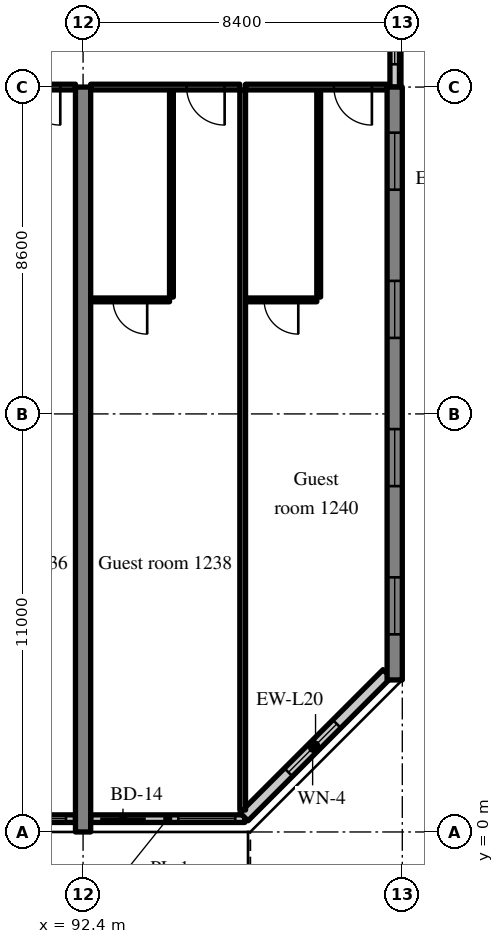
"""IFC4 building model, lengths in metres.
Left out: names, types, materials, properties, quantities, classifications, styles, units other than length and angle.
Written with IfcOpenShell. Run it as: python <this file> out.ifc"""

import sys

from ifc_helpers import new_model, si_unit, direction, frame, frame_2d, origin, place, context, subcontext, project, spatial, rectangle, extrude, source, transform, mapped, element, fill, save


model = new_model("IFC4")
c1 = context("Model", 3, precision=1e-05, world=origin(), true_north=direction((0.0, 1.0)))
c2 = subcontext(c1, "Body", "Model", "MODEL_VIEW")
j1 = project(units=[si_unit("LENGTHUNIT", "METRE"), si_unit("PLANEANGLEUNIT", "RADIAN")], contexts=[c1])
p1 = place(None, origin())
s1 = spatial("IfcSite", under=j1, at=p1, CompositionType="ELEMENT")
p2 = place(p1, origin())
s2 = spatial("IfcBuilding", under=s1, at=p2, CompositionType="ELEMENT")
p3 = place(p2, frame((0.0, 0.0, 54.4)))
s3 = spatial("IfcBuildingStorey", under=s2, at=p3, CompositionType="ELEMENT", Elevation=54.4)
m1 = source(origin(), c2, "Body", "SweptSolid", [
    extrude(rectangle(XDim=19.6, YDim=0.4, at=frame_2d((9.8, 0.0))), origin(), (0.0, 0.0, 1.0), 3.52),
])
p4 = place(p3, frame((92.4, 0.0, 0.0), z_axis=(0.0, 0.0, 1.0), x_axis=(0.0, 1.0, 0.0)))
e1 = element("IfcWall", 1, at=p4, inside=s3, PredefinedType="SHEAR", context=c2, shape_type="MappedRepresentation", body=[
    mapped(m1, transform((0.0, 0.0, 0.0), scale=1.0)),
])
m2 = source(origin(), c2, "Body", "SweptSolid", [
    extrude(rectangle(XDim=15.6, YDim=0.4, at=frame_2d((7.8, 0.0))), origin(), (0.0, 0.0, 1.0), 3.52),
])
p5 = place(p3, frame((100.6, 4.0, 0.0), z_axis=(0.0, 0.0, 1.0), x_axis=(0.0, 1.0, 0.0)))
e2 = element("IfcWall", 2, at=p5, inside=s3, PredefinedType="SHEAR", context=c2, shape_type="MappedRepresentation", body=[
    mapped(m2, transform((0.0, 0.0, 0.0), scale=1.0)),
])
m3 = source(origin(), c2, "Body", "SweptSolid", [
    extrude(rectangle(XDim=1.5, YDim=1.5, at=frame_2d((0.75, 0.75))), frame((0.0, 0.21, 0.0), z_axis=(0.0, -1.0, 0.0), x_axis=(1.0, 0.0, 0.0)), (0.0, 0.0, 1.0), 0.42),
])
p6 = place(p5, frame((1.2, 0.0, 0.9)))
e3 = element("IfcOpeningElement", 3, at=p6, cuts=e2, PredefinedType="OPENING", context=c2, shape_type="MappedRepresentation", body=[
    mapped(m3, transform((0.0, 0.0, 0.0), scale=1.0)),
])
p7 = place(p5, frame((5.1, 0.0, 0.9)))
e4 = element("IfcOpeningElement", 4, at=p7, cuts=e2, PredefinedType="OPENING", context=c2, shape_type="MappedRepresentation", body=[
    mapped(m3, transform((0.0, 0.0, 0.0), scale=1.0)),
])
p8 = place(p5, frame((9.0, 0.0, 0.9)))
e5 = element("IfcOpeningElement", 5, at=p8, cuts=e2, PredefinedType="OPENING", context=c2, shape_type="MappedRepresentation", body=[
    mapped(m3, transform((0.0, 0.0, 0.0), scale=1.0)),
])
p9 = place(p5, frame((12.9, 0.0, 0.9)))
e6 = element("IfcOpeningElement", 6, at=p9, cuts=e2, PredefinedType="OPENING", context=c2, shape_type="MappedRepresentation", body=[
    mapped(m3, transform((0.0, 0.0, 0.0), scale=1.0)),
])
m4 = source(origin(), c2, "Body", "SweptSolid", [
    extrude(rectangle(XDim=3.6, YDim=0.2, at=frame_2d((1.8, 0.0))), origin(), (0.0, 0.0, 1.0), 2.82),
])
p10 = place(p3, frame((88.6, 0.35, 0.0), z_axis=(0.0, 0.0, 1.0), x_axis=(1.0, 0.0, 0.0)))
e7 = element("IfcWall", 7, at=p10, inside=s3, PredefinedType="SOLIDWALL", context=c2, shape_type="MappedRepresentation", body=[
    mapped(m4, transform((0.0, 0.0, 0.0), scale=1.0)),
])
m5 = source(origin(), c2, "Body", "SweptSolid", [
    extrude(rectangle(XDim=1.2, YDim=2.4, at=frame_2d((0.6, 1.2))), frame((0.0, 0.11, 0.0), z_axis=(0.0, -1.0, 0.0), x_axis=(1.0, 0.0, 0.0)), (0.0, 0.0, 1.0), 0.22),
])
p11 = place(p10, frame((0.25, 0.0, 0.0)))
e8 = element("IfcOpeningElement", 8, at=p11, cuts=e7, PredefinedType="OPENING", context=c2, shape_type="MappedRepresentation", body=[
    mapped(m5, transform((0.0, 0.0, 0.0), scale=1.0)),
])
m6 = source(origin(), c2, "Body", "SweptSolid", [
    extrude(rectangle(XDim=1.5, YDim=1.5, at=frame_2d((0.75, 0.75))), frame((0.0, 0.11, 0.0), z_axis=(0.0, -1.0, 0.0), x_axis=(1.0, 0.0, 0.0)), (0.0, 0.0, 1.0), 0.22),
])
p12 = place(p10, frame((1.85, 0.0, 0.9)))
e9 = element("IfcOpeningElement", 9, at=p12, cuts=e7, PredefinedType="OPENING", context=c2, shape_type="MappedRepresentation", body=[
    mapped(m6, transform((0.0, 0.0, 0.0), scale=1.0)),
])
m7 = source(origin(), c2, "Body", "SweptSolid", [
    extrude(rectangle(XDim=4.055, YDim=0.2, at=frame_2d((2.027, 0.0))), origin(), (0.0, 0.0, 1.0), 2.82),
])
p13 = place(p3, frame((92.6, 0.35, 0.0), z_axis=(0.0, 0.0, 1.0), x_axis=(1.0, 0.0, 0.0)))
e10 = element("IfcWall", 10, at=p13, inside=s3, PredefinedType="SOLIDWALL", context=c2, shape_type="MappedRepresentation", body=[
    mapped(m7, transform((0.0, 0.0, 0.0), scale=1.0)),
])
p14 = place(p13, frame((0.25, 0.0, 0.0)))
e11 = element("IfcOpeningElement", 11, at=p14, cuts=e10, PredefinedType="OPENING", context=c2, shape_type="MappedRepresentation", body=[
    mapped(m5, transform((0.0, 0.0, 0.0), scale=1.0)),
])
p15 = place(p13, frame((2.305, 0.0, 0.9)))
e12 = element("IfcOpeningElement", 12, at=p15, cuts=e10, PredefinedType="OPENING", context=c2, shape_type="MappedRepresentation", body=[
    mapped(m6, transform((0.0, 0.0, 0.0), scale=1.0)),
])
m8 = source(origin(), c2, "Body", "SweptSolid", [
    extrude(rectangle(XDim=5.326, YDim=0.3, at=frame_2d((2.663, 0.0))), origin(), (0.0, 0.0, 1.0), 3.52),
])
p16 = place(p3, frame((96.634, 0.4, 0.0), z_axis=(0.0, 0.0, 1.0), x_axis=(0.707083859269, 0.707129702361, 0.0)))
e13 = element("IfcWall", 13, at=p16, inside=s3, PredefinedType="SOLIDWALL", context=c2, shape_type="MappedRepresentation", body=[
    mapped(m8, transform((0.0, 0.0, 0.0), scale=1.0)),
])
m9 = source(origin(), c2, "Body", "SweptSolid", [
    extrude(rectangle(XDim=1.8, YDim=1.5, at=frame_2d((0.9, 0.75))), frame((0.0, 0.16, 0.0), z_axis=(0.0, -1.0, 0.0), x_axis=(1.0, 0.0, 0.0)), (0.0, 0.0, 1.0), 0.32),
])
p17 = place(p16, frame((1.654, 0.0, 0.9)))
e14 = element("IfcOpeningElement", 14, at=p17, cuts=e13, PredefinedType="OPENING", context=c2, shape_type="MappedRepresentation", body=[
    mapped(m9, transform((0.0, 0.0, 0.0), scale=1.0)),
])
m10 = source(origin(), c2, "Body", "SweptSolid", [
    extrude(rectangle(XDim=2.4, YDim=0.25, at=frame_2d((1.2, 0.0))), origin(), (0.0, 0.0, 1.0), 2.62),
])
p18 = place(p3, frame((100.6, 19.6, 0.0), z_axis=(0.0, 0.0, 1.0), x_axis=(0.0, 1.0, 0.0)))
e15 = element("IfcWall", 15, at=p18, inside=s3, PredefinedType="SOLIDWALL", context=c2, shape_type="MappedRepresentation", body=[
    mapped(m10, transform((0.0, 0.0, 0.0), scale=1.0)),
])
m11 = source(origin(), c2, "Body", "SweptSolid", [
    extrude(rectangle(XDim=1.2, YDim=1.5, at=frame_2d((0.6, 0.75))), frame((0.0, 0.135, 0.0), z_axis=(0.0, -1.0, 0.0), x_axis=(1.0, 0.0, 0.0)), (0.0, 0.0, 1.0), 0.27),
])
p19 = place(p18, frame((0.6, 0.0, 0.9)))
e16 = element("IfcOpeningElement", 16, at=p19, cuts=e15, PredefinedType="OPENING", context=c2, shape_type="MappedRepresentation", body=[
    mapped(m11, transform((0.0, 0.0, 0.0), scale=1.0)),
])
m12 = source(origin(), c2, "Body", "SweptSolid", [
    extrude(rectangle(XDim=3.925, YDim=0.15, at=frame_2d((1.962, 0.0))), origin(), (0.0, 0.0, 1.0), 2.82),
])
p20 = place(p3, frame((88.275, 19.6, 0.0), z_axis=(0.0, 0.0, 1.0), x_axis=(1.0, 0.0, 0.0)))
e17 = element("IfcWall", 17, at=p20, inside=s3, PredefinedType="PARTITIONING", context=c2, shape_type="MappedRepresentation", body=[
    mapped(m12, transform((0.0, 0.0, 0.0), scale=1.0)),
])
m13 = source(origin(), c2, "Body", "SweptSolid", [
    extrude(rectangle(XDim=1.0, YDim=2.1, at=frame_2d((0.5, 1.05))), frame((0.0, 0.085, 0.0), z_axis=(0.0, -1.0, 0.0), x_axis=(1.0, 0.0, 0.0)), (0.0, 0.0, 1.0), 0.17),
])
p21 = place(p20, frame((2.525, 0.0, 0.0)))
e18 = element("IfcOpeningElement", 18, at=p21, cuts=e17, PredefinedType="OPENING", context=c2, shape_type="MappedRepresentation", body=[
    mapped(m13, transform((0.0, 0.0, 0.0), scale=1.0)),
])
m14 = source(origin(), c2, "Body", "SweptSolid", [
    extrude(rectangle(XDim=5.45, YDim=0.1, at=frame_2d((2.725, 0.0))), origin(), (0.0, 0.0, 1.0), 3.52),
])
p22 = place(p3, frame((94.725, 14.075, 0.0), z_axis=(0.0, 0.0, 1.0), x_axis=(0.0, 1.0, 0.0)))
e19 = element("IfcWall", 19, at=p22, inside=s3, PredefinedType="PARTITIONING", context=c2, shape_type="MappedRepresentation", body=[
    mapped(m14, transform((0.0, 0.0, 0.0), scale=1.0)),
])
m15 = source(origin(), c2, "Body", "SweptSolid", [
    extrude(rectangle(XDim=2.075, YDim=0.1, at=frame_2d((1.038, 0.0))), origin(), (0.0, 0.0, 1.0), 3.52),
])
p23 = place(p3, frame((92.6, 14.0, 0.0), z_axis=(0.0, 0.0, 1.0), x_axis=(1.0, 0.0, 0.0)))
e20 = element("IfcWall", 20, at=p23, inside=s3, PredefinedType="PARTITIONING", context=c2, shape_type="MappedRepresentation", body=[
    mapped(m15, transform((0.0, 0.0, 0.0), scale=1.0)),
])
m16 = source(origin(), c2, "Body", "SweptSolid", [
    extrude(rectangle(XDim=0.9, YDim=2.1, at=frame_2d((0.45, 1.05))), frame((0.0, 0.06, 0.0), z_axis=(0.0, -1.0, 0.0), x_axis=(1.0, 0.0, 0.0)), (0.0, 0.0, 1.0), 0.12),
])
p24 = place(p23, frame((0.587, 0.0, 0.0)))
e21 = element("IfcOpeningElement", 21, at=p24, cuts=e20, PredefinedType="OPENING", context=c2, shape_type="MappedRepresentation", body=[
    mapped(m16, transform((0.0, 0.0, 0.0), scale=1.0)),
])
m17 = source(origin(), c2, "Body", "SweptSolid", [
    extrude(rectangle(XDim=3.925, YDim=0.15, at=frame_2d((1.962, 0.0))), origin(), (0.0, 0.0, 1.0), 2.82),
])
p25 = place(p3, frame((92.6, 19.6, 0.0), z_axis=(0.0, 0.0, 1.0), x_axis=(1.0, 0.0, 0.0)))
e22 = element("IfcWall", 22, at=p25, inside=s3, PredefinedType="PARTITIONING", context=c2, shape_type="MappedRepresentation", body=[
    mapped(m17, transform((0.0, 0.0, 0.0), scale=1.0)),
])
p26 = place(p25, frame((2.525, 0.0, 0.0)))
e23 = element("IfcOpeningElement", 23, at=p26, cuts=e22, PredefinedType="OPENING", context=c2, shape_type="MappedRepresentation", body=[
    mapped(m13, transform((0.0, 0.0, 0.0), scale=1.0)),
])
p27 = place(p3, frame((98.6, 14.075, 0.0), z_axis=(0.0, 0.0, 1.0), x_axis=(0.0, 1.0, 0.0)))
e24 = element("IfcWall", 24, at=p27, inside=s3, PredefinedType="PARTITIONING", context=c2, shape_type="MappedRepresentation", body=[
    mapped(m14, transform((0.0, 0.0, 0.0), scale=1.0)),
])
m18 = source(origin(), c2, "Body", "SweptSolid", [
    extrude(rectangle(XDim=1.875, YDim=0.1, at=frame_2d((0.938, 0.0))), origin(), (0.0, 0.0, 1.0), 3.52),
])
p28 = place(p3, frame((96.675, 14.0, 0.0), z_axis=(0.0, 0.0, 1.0), x_axis=(1.0, 0.0, 0.0)))
e25 = element("IfcWall", 25, at=p28, inside=s3, PredefinedType="PARTITIONING", context=c2, shape_type="MappedRepresentation", body=[
    mapped(m18, transform((0.0, 0.0, 0.0), scale=1.0)),
])
p29 = place(p28, frame((0.488, 0.0, 0.0)))
e26 = element("IfcOpeningElement", 26, at=p29, cuts=e25, PredefinedType="OPENING", context=c2, shape_type="MappedRepresentation", body=[
    mapped(m16, transform((0.0, 0.0, 0.0), scale=1.0)),
])
m19 = source(origin(), c2, "Body", "SweptSolid", [
    extrude(rectangle(XDim=3.725, YDim=0.15, at=frame_2d((1.862, 0.0))), origin(), (0.0, 0.0, 1.0), 2.82),
])
p30 = place(p3, frame((96.675, 19.6, 0.0), z_axis=(0.0, 0.0, 1.0), x_axis=(1.0, 0.0, 0.0)))
e27 = element("IfcWall", 27, at=p30, inside=s3, PredefinedType="PARTITIONING", context=c2, shape_type="MappedRepresentation", body=[
    mapped(m19, transform((0.0, 0.0, 0.0), scale=1.0)),
])
p31 = place(p30, frame((2.325, 0.0, 0.0)))
e28 = element("IfcOpeningElement", 28, at=p31, cuts=e27, PredefinedType="OPENING", context=c2, shape_type="MappedRepresentation", body=[
    mapped(m13, transform((0.0, 0.0, 0.0), scale=1.0)),
])
m20 = source(origin(), c2, "Body", "SweptSolid", [
    extrude(rectangle(XDim=18.947, YDim=0.15, at=frame_2d((9.474, 0.0))), origin(), (0.0, 0.0, 1.0), 3.52),
])
p32 = place(p3, frame((96.6, 0.578, 0.0), z_axis=(0.0, 0.0, 1.0), x_axis=(0.0, 1.0, 0.0)))
e29 = element("IfcWall", 29, at=p32, inside=s3, PredefinedType="PARTITIONING", context=c2, shape_type="MappedRepresentation", body=[
    mapped(m20, transform((0.0, 0.0, 0.0), scale=1.0)),
])
m21 = source(origin(), c2, "Body", "SweptSolid", [
    extrude(rectangle(XDim=1.5, YDim=1.5, at=frame_2d((0.75, 0.75))), frame((0.0, 0.03, 0.0), z_axis=(0.0, -1.0, 0.0), x_axis=(1.0, 0.0, 0.0)), (0.0, 0.0, 1.0), 0.06),
])
p33 = place(p12, origin())
e30 = element("IfcWindow", 30, at=p33, inside=s3, PartitioningType="SINGLE_PANEL", PredefinedType="WINDOW", context=c2, shape_type="MappedRepresentation", body=[
    mapped(m21, transform((0.0, 0.0, 0.0), scale=1.0)),
])
fill(e9, e30)
m22 = source(origin(), c2, "Body", "SweptSolid", [
    extrude(rectangle(XDim=1.2, YDim=2.4, at=frame_2d((0.6, 1.2))), frame((0.0, 0.025, 0.0), z_axis=(0.0, -1.0, 0.0), x_axis=(1.0, 0.0, 0.0)), (0.0, 0.0, 1.0), 0.05),
])
p34 = place(p14, origin())
e31 = element("IfcDoor", 31, at=p34, inside=s3, OperationType="SLIDING_TO_RIGHT", PredefinedType="DOOR", context=c2, shape_type="MappedRepresentation", body=[
    mapped(m22, transform((0.0, 0.0, 0.0), scale=1.0)),
])
fill(e11, e31)
p35 = place(p15, origin())
e32 = element("IfcWindow", 32, at=p35, inside=s3, PartitioningType="SINGLE_PANEL", PredefinedType="WINDOW", context=c2, shape_type="MappedRepresentation", body=[
    mapped(m21, transform((0.0, 0.0, 0.0), scale=1.0)),
])
fill(e12, e32)
m23 = source(origin(), c2, "Body", "SweptSolid", [
    extrude(rectangle(XDim=1.8, YDim=1.5, at=frame_2d((0.9, 0.75))), frame((0.0, 0.03, 0.0), z_axis=(0.0, -1.0, 0.0), x_axis=(1.0, 0.0, 0.0)), (0.0, 0.0, 1.0), 0.06),
])
p36 = place(p17, origin())
e33 = element("IfcWindow", 33, at=p36, inside=s3, PartitioningType="SINGLE_PANEL", PredefinedType="WINDOW", context=c2, shape_type="MappedRepresentation", body=[
    mapped(m23, transform((0.0, 0.0, 0.0), scale=1.0)),
])
fill(e14, e33)
p37 = place(p6, origin())
e34 = element("IfcWindow", 34, at=p37, inside=s3, PartitioningType="SINGLE_PANEL", PredefinedType="WINDOW", context=c2, shape_type="MappedRepresentation", body=[
    mapped(m21, transform((0.0, 0.0, 0.0), scale=1.0)),
])
fill(e3, e34)
p38 = place(p7, origin())
e35 = element("IfcWindow", 35, at=p38, inside=s3, PartitioningType="SINGLE_PANEL", PredefinedType="WINDOW", context=c2, shape_type="MappedRepresentation", body=[
    mapped(m21, transform((0.0, 0.0, 0.0), scale=1.0)),
])
fill(e4, e35)
p39 = place(p8, origin())
e36 = element("IfcWindow", 36, at=p39, inside=s3, PartitioningType="SINGLE_PANEL", PredefinedType="WINDOW", context=c2, shape_type="MappedRepresentation", body=[
    mapped(m21, transform((0.0, 0.0, 0.0), scale=1.0)),
])
fill(e5, e36)
p40 = place(p9, origin())
e37 = element("IfcWindow", 37, at=p40, inside=s3, PartitioningType="SINGLE_PANEL", PredefinedType="WINDOW", context=c2, shape_type="MappedRepresentation", body=[
    mapped(m21, transform((0.0, 0.0, 0.0), scale=1.0)),
])
fill(e6, e37)
m24 = source(origin(), c2, "Body", "SweptSolid", [
    extrude(rectangle(XDim=1.2, YDim=1.5, at=frame_2d((0.6, 0.75))), frame((0.0, 0.03, 0.0), z_axis=(0.0, -1.0, 0.0), x_axis=(1.0, 0.0, 0.0)), (0.0, 0.0, 1.0), 0.06),
])
p41 = place(p19, origin())
e38 = element("IfcWindow", 38, at=p41, inside=s3, PartitioningType="SINGLE_PANEL", PredefinedType="WINDOW", context=c2, shape_type="MappedRepresentation", body=[
    mapped(m24, transform((0.0, 0.0, 0.0), scale=1.0)),
])
fill(e16, e38)
m25 = source(origin(), c2, "Body", "SweptSolid", [
    extrude(rectangle(XDim=1.0, YDim=2.1, at=frame_2d((0.5, 1.05))), frame((0.0, 0.025, 0.0), z_axis=(0.0, -1.0, 0.0), x_axis=(1.0, 0.0, 0.0)), (0.0, 0.0, 1.0), 0.05),
])
p42 = place(p21, origin())
e39 = element("IfcDoor", 39, at=p42, inside=s3, OperationType="SINGLE_SWING_RIGHT", PredefinedType="DOOR", context=c2, shape_type="MappedRepresentation", body=[
    mapped(m25, transform((0.0, 0.0, 0.0), scale=1.0)),
])
fill(e18, e39)
m26 = source(origin(), c2, "Body", "SweptSolid", [
    extrude(rectangle(XDim=0.9, YDim=2.1, at=frame_2d((0.45, 1.05))), frame((0.0, 0.025, 0.0), z_axis=(0.0, -1.0, 0.0), x_axis=(1.0, 0.0, 0.0)), (0.0, 0.0, 1.0), 0.05),
])
p43 = place(p24, origin())
e40 = element("IfcDoor", 40, at=p43, inside=s3, OperationType="SINGLE_SWING_RIGHT", PredefinedType="DOOR", context=c2, shape_type="MappedRepresentation", body=[
    mapped(m26, transform((0.0, 0.0, 0.0), scale=1.0)),
])
fill(e21, e40)
p44 = place(p26, origin())
e41 = element("IfcDoor", 41, at=p44, inside=s3, OperationType="SINGLE_SWING_RIGHT", PredefinedType="DOOR", context=c2, shape_type="MappedRepresentation", body=[
    mapped(m25, transform((0.0, 0.0, 0.0), scale=1.0)),
])
fill(e23, e41)
p45 = place(p29, origin())
e42 = element("IfcDoor", 42, at=p45, inside=s3, OperationType="SINGLE_SWING_RIGHT", PredefinedType="DOOR", context=c2, shape_type="MappedRepresentation", body=[
    mapped(m26, transform((0.0, 0.0, 0.0), scale=1.0)),
])
fill(e26, e42)
p46 = place(p31, origin())
e43 = element("IfcDoor", 43, at=p46, inside=s3, OperationType="SINGLE_SWING_RIGHT", PredefinedType="DOOR", context=c2, shape_type="MappedRepresentation", body=[
    mapped(m25, transform((0.0, 0.0, 0.0), scale=1.0)),
])
fill(e28, e43)
save(model, sys.argv[1])
